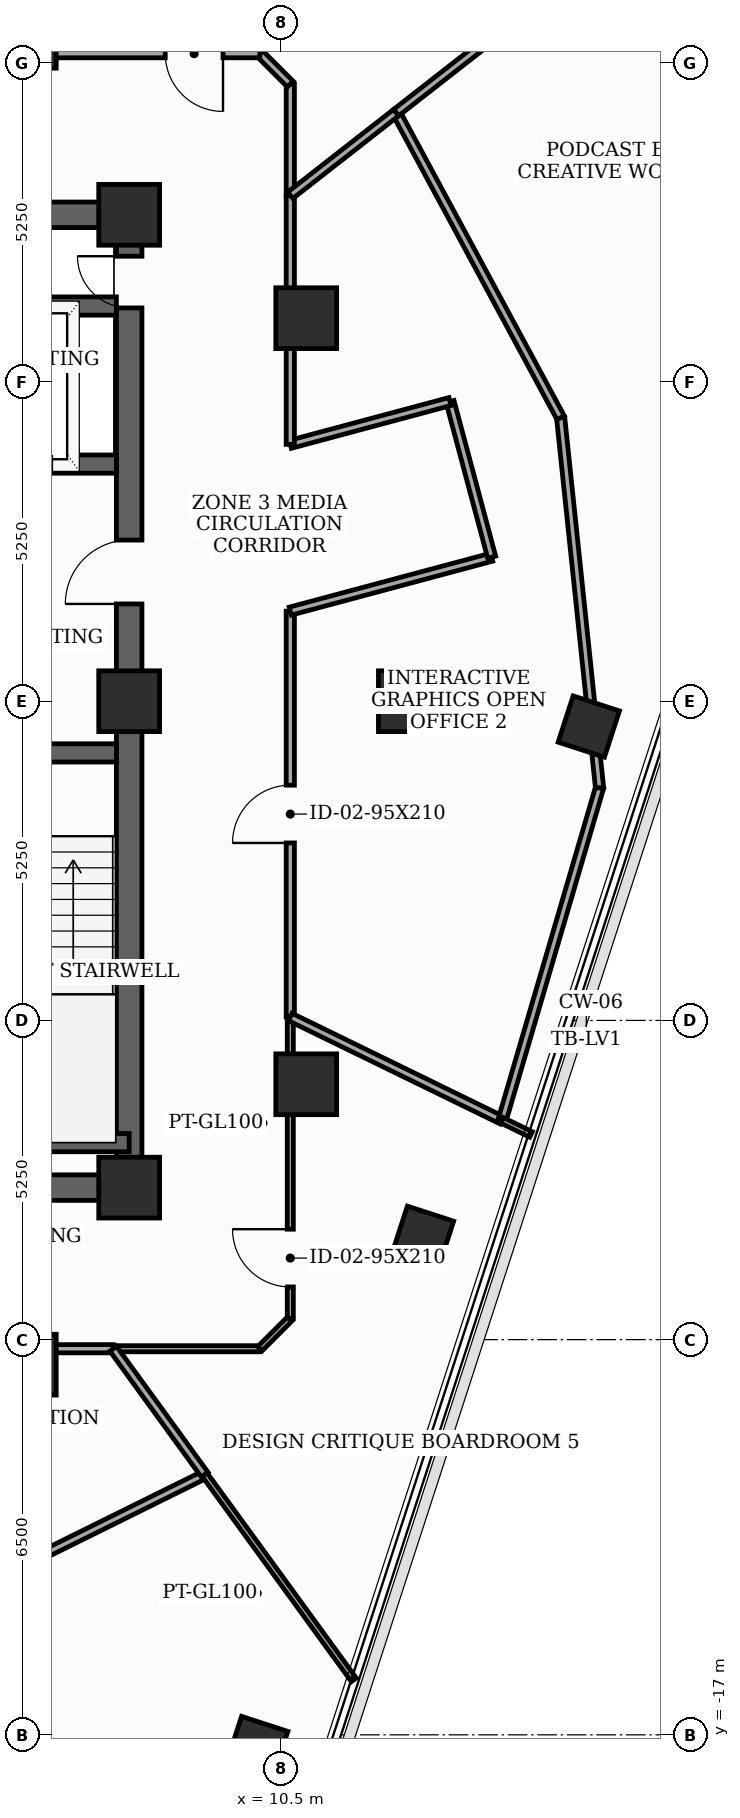
"""IFC4 building model, lengths in metres.
Left out: names, types, materials, properties, quantities, classifications, styles, units other than length and angle.
Written with IfcOpenShell. Run it as: python <this file> out.ifc"""

import sys

from ifc_helpers import new_model, si_unit, direction, frame, frame_2d, origin, origin_2d, place, context, subcontext, project, spatial, rectangle, extrude, element, fill, save


model = new_model("IFC4")
c1 = context("Model", 3, precision=1e-05, world=origin(), true_north=direction((0.0, 1.0)))
c2 = subcontext(c1, "Body", "Model", "MODEL_VIEW")
j1 = project(units=[si_unit("LENGTHUNIT", "METRE"), si_unit("PLANEANGLEUNIT", "RADIAN")], contexts=[c1])
p1 = place(None, origin())
s1 = spatial("IfcSite", under=j1, at=p1, CompositionType="ELEMENT")
p2 = place(p1, origin())
s2 = spatial("IfcBuilding", under=s1, at=p2, CompositionType="ELEMENT")
p3 = place(p2, frame((0.0, 0.0, 301.7)))
s3 = spatial("IfcBuildingStorey", under=s2, at=p3, CompositionType="ELEMENT", Elevation=301.7)
for number, where, z_axis, x_axis in (
    (1, (8.0, -8.0, 0.0), (0.0, 0.0, 1.0), (1.0, 0.0, 0.0)),
    (2, (8.0, 0.0, 0.0), (0.0, 0.0, 1.0), (1.0, 0.0, 0.0)),
    (3, (8.0, 8.0, 0.0), (0.0, 0.0, 1.0), (1.0, 0.0, 0.0)),
    (4, (12.6, 0.0, 0.0), (0.0, 0.0, 1.0), (1.0, 0.0, 0.0)),
    (5, (10.912, 6.3, 0.0), (0.0, 0.0, 1.0), (1.0, 0.0, 0.0)),
    (6, (6.3, 10.912, 0.0), (0.0, 0.0, 1.0), (1.0, 0.0, 0.0)),
    (7, (6.3, -10.912, 0.0), (0.0, 0.0, 1.0), (1.0, 0.0, 0.0)),
    (8, (10.912, -6.3, 0.0), (0.0, 0.0, 1.0), (1.0, 0.0, 0.0)),
):
    element("IfcColumn", number, at=place(p3, frame(where, z_axis=z_axis, x_axis=x_axis)), inside=s3, PredefinedType="COLUMN", context=c2, shape_type="SweptSolid", body=[
        extrude(rectangle(XDim=1.0, YDim=1.0, at=origin_2d()), origin(), (0.0, 0.0, 1.0), 3.7),
    ])
for number, where, z_axis, x_axis in (
    (9, (10.106, -17.201, 0.0), (0.0, 0.0, 1.0), (0.309, 0.951, 0.0)),
    (10, (12.833, -8.809, 0.0), (0.0, 0.0, 1.0), (0.309, 0.951, 0.0)),
    (11, (15.559, -0.417, 0.0), (0.0, 0.0, 1.0), (0.309, 0.951, 0.0)),
):
    element("IfcColumn", number, at=place(p3, frame(where, z_axis=z_axis, x_axis=x_axis)), inside=s3, PredefinedType="COLUMN", context=c2, shape_type="SweptSolid", body=[
        extrude(rectangle(XDim=0.8, YDim=0.8, at=origin_2d()), origin(), (0.0, 0.0, 1.0), 3.7),
    ])
p4 = place(p3, frame((8.0, -8.0, 0.0), z_axis=(0.0, 0.0, 1.0), x_axis=(0.0, 1.0, 0.0)))
e12 = element("IfcWall", 12, at=p4, inside=s3, PredefinedType="SHEAR", context=c2, shape_type="SweptSolid", body=[
    extrude(rectangle(XDim=16.0, YDim=0.42, at=frame_2d((8.0, 0.0))), origin(), (0.0, 0.0, 1.0), 3.5),
])
p5 = place(p4, frame((9.6, 0.0, 0.0)))
e13 = element("IfcOpeningElement", 13, at=p5, cuts=e12, PredefinedType="OPENING", context=c2, shape_type="SweptSolid", body=[
    extrude(rectangle(XDim=1.05, YDim=2.15, at=frame_2d((0.525, 1.075))), frame((0.0, 0.22, 0.0), z_axis=(0.0, -1.0, 0.0), x_axis=(1.0, 0.0, 0.0)), (0.0, 0.0, 1.0), 0.44),
])
p6 = place(p4, frame((14.469, 0.0, 0.0)))
e14 = element("IfcOpeningElement", 14, at=p6, cuts=e12, PredefinedType="OPENING", context=c2, shape_type="SweptSolid", body=[
    extrude(rectangle(XDim=0.85, YDim=2.02, at=frame_2d((0.425, 1.01))), frame((0.0, 0.22, 0.0), z_axis=(0.0, -1.0, 0.0), x_axis=(1.0, 0.0, 0.0)), (0.0, 0.0, 1.0), 0.44),
])
p7 = place(p3, frame((-8.0, -8.0, 0.0), z_axis=(0.0, 0.0, 1.0), x_axis=(1.0, 0.0, 0.0)))
e15 = element("IfcWall", 15, at=p7, inside=s3, PredefinedType="SHEAR", context=c2, shape_type="SweptSolid", body=[
    extrude(rectangle(XDim=16.0, YDim=0.42, at=frame_2d((8.0, 0.0))), origin(), (0.0, 0.0, 1.0), 3.5),
])
p8 = place(p7, frame((4.6, 0.0, 0.0)))
e16 = element("IfcOpeningElement", 16, at=p8, cuts=e15, PredefinedType="OPENING", context=c2, shape_type="SweptSolid", body=[
    extrude(rectangle(XDim=0.95, YDim=2.1, at=frame_2d((0.475, 1.05))), frame((0.0, 0.22, 0.0), z_axis=(0.0, -1.0, 0.0), x_axis=(1.0, 0.0, 0.0)), (0.0, 0.0, 1.0), 0.44),
])
p9 = place(p7, frame((7.52, 0.0, 0.0)))
e17 = element("IfcOpeningElement", 17, at=p9, cuts=e15, PredefinedType="OPENING", context=c2, shape_type="SweptSolid", body=[
    extrude(rectangle(XDim=0.95, YDim=2.1, at=frame_2d((0.475, 1.05))), frame((0.0, 0.22, 0.0), z_axis=(0.0, -1.0, 0.0), x_axis=(1.0, 0.0, 0.0)), (0.0, 0.0, 1.0), 0.44),
])
p10 = place(p7, frame((10.45, 0.0, 0.0)))
e18 = element("IfcOpeningElement", 18, at=p10, cuts=e15, PredefinedType="OPENING", context=c2, shape_type="SweptSolid", body=[
    extrude(rectangle(XDim=0.95, YDim=2.1, at=frame_2d((0.475, 1.05))), frame((0.0, 0.22, 0.0), z_axis=(0.0, -1.0, 0.0), x_axis=(1.0, 0.0, 0.0)), (0.0, 0.0, 1.0), 0.44),
])
p11 = place(p3, frame((-8.0, 8.0, 0.0), z_axis=(0.0, 0.0, 1.0), x_axis=(1.0, 0.0, 0.0)))
e19 = element("IfcWall", 19, at=p11, inside=s3, PredefinedType="SHEAR", context=c2, shape_type="SweptSolid", body=[
    extrude(rectangle(XDim=16.0, YDim=0.42, at=frame_2d((8.0, 0.0))), origin(), (0.0, 0.0, 1.0), 3.5),
])
p12 = place(p11, frame((7.1, 0.0, 0.0)))
e20 = element("IfcOpeningElement", 20, at=p12, cuts=e19, PredefinedType="OPENING", context=c2, shape_type="SweptSolid", body=[
    extrude(rectangle(XDim=1.8, YDim=2.15, at=frame_2d((0.9, 1.075))), frame((0.0, 0.22, 0.0), z_axis=(0.0, -1.0, 0.0), x_axis=(1.0, 0.0, 0.0)), (0.0, 0.0, 1.0), 0.44),
])
p13 = place(p3, frame((4.45, -0.85, 0.0), z_axis=(0.0, 0.0, 1.0), x_axis=(1.0, 0.0, 0.0)))
e21 = element("IfcWall", 21, at=p13, inside=s3, PredefinedType="SHEAR", context=c2, shape_type="SweptSolid", body=[
    extrude(rectangle(XDim=3.34, YDim=0.3, at=frame_2d((1.67, 0.0))), origin(), (0.0, 0.0, 1.0), 3.5),
])
p14 = place(p13, frame((0.65, 0.0, 0.0)))
e22 = element("IfcOpeningElement", 22, at=p14, cuts=e21, PredefinedType="OPENING", context=c2, shape_type="SweptSolid", body=[
    extrude(rectangle(XDim=1.05, YDim=2.15, at=frame_2d((0.525, 1.075))), frame((0.0, 0.16, 0.0), z_axis=(0.0, -1.0, 0.0), x_axis=(1.0, 0.0, 0.0)), (0.0, 0.0, 1.0), 0.32),
])
p15 = place(p3, frame((4.45, -7.26, 0.0), z_axis=(0.0, 0.0, 1.0), x_axis=(1.0, 0.0, 0.0)))
e23 = element("IfcWall", 23, at=p15, inside=s3, PredefinedType="SHEAR", context=c2, shape_type="SweptSolid", body=[
    extrude(rectangle(XDim=3.55, YDim=0.3, at=frame_2d((1.775, 0.0))), origin(), (0.0, 0.0, 1.0), 3.5),
])
p16 = place(p3, frame((4.45, 3.9, 0.0), z_axis=(0.0, 0.0, 1.0), x_axis=(1.0, 0.0, 0.0)))
e24 = element("IfcWall", 24, at=p16, inside=s3, PredefinedType="SHEAR", context=c2, shape_type="SweptSolid", body=[
    extrude(rectangle(XDim=3.34, YDim=0.3, at=frame_2d((1.67, 0.0))), origin(), (0.0, 0.0, 1.0), 3.5),
])
p17 = place(p16, frame((1.18, 0.0, 0.0)))
e25 = element("IfcOpeningElement", 25, at=p17, cuts=e24, PredefinedType="OPENING", context=c2, shape_type="SweptSolid", body=[
    extrude(rectangle(XDim=1.1, YDim=2.1, at=frame_2d((0.55, 1.05))), frame((0.0, 0.16, 0.0), z_axis=(0.0, -1.0, 0.0), x_axis=(1.0, 0.0, 0.0)), (0.0, 0.0, 1.0), 0.32),
])
p18 = place(p3, frame((4.45, 6.5, 0.0), z_axis=(0.0, 0.0, 1.0), x_axis=(1.0, 0.0, 0.0)))
e26 = element("IfcWall", 26, at=p18, inside=s3, PredefinedType="SHEAR", context=c2, shape_type="SweptSolid", body=[
    extrude(rectangle(XDim=3.34, YDim=0.3, at=frame_2d((1.67, 0.0))), origin(), (0.0, 0.0, 1.0), 3.5),
])
p19 = place(p3, frame((10.65, -5.194, 0.0), z_axis=(0.0, 0.0, 1.0), x_axis=(0.0, 1.0, 0.0)))
e27 = element("IfcWall", 27, at=p19, inside=s3, PredefinedType="PARTITIONING", context=c2, shape_type="SweptSolid", body=[
    extrude(rectangle(XDim=6.676, YDim=0.135, at=frame_2d((3.338, 0.0))), origin(), (0.0, 0.0, 1.0), 2.885),
])
p20 = place(p19, frame((2.863, 0.0, 0.0)))
e28 = element("IfcOpeningElement", 28, at=p20, cuts=e27, PredefinedType="OPENING", context=c2, shape_type="SweptSolid", body=[
    extrude(rectangle(XDim=0.95, YDim=2.1, at=frame_2d((0.475, 1.05))), frame((0.0, 0.077, 0.0), z_axis=(0.0, -1.0, 0.0), x_axis=(1.0, 0.0, 0.0)), (0.0, 0.0, 1.0), 0.155),
])
p21 = place(p3, frame((10.65, 1.482, 0.0), z_axis=(0.0, 0.0, 1.0), x_axis=(0.965961397105, 0.2586862565, 0.0)))
e29 = element("IfcWall", 29, at=p21, inside=s3, PredefinedType="PARTITIONING", context=c2, shape_type="SweptSolid", body=[
    extrude(rectangle(XDim=3.429, YDim=0.135, at=frame_2d((1.714, 0.0))), origin(), (0.0, 0.0, 1.0), 2.885),
])
p22 = place(p3, frame((13.962, 2.369, 0.0), z_axis=(0.0, 0.0, 1.0), x_axis=(-0.258413725385, 0.966034340245, 0.0)))
e30 = element("IfcWall", 30, at=p22, inside=s3, PredefinedType="PARTITIONING", context=c2, shape_type="SweptSolid", body=[
    extrude(rectangle(XDim=2.65, YDim=0.135, at=frame_2d((1.325, 0.0))), origin(), (0.0, 0.0, 1.0), 3.5),
])
p23 = place(p3, frame((13.277, 4.929, 0.0), z_axis=(0.0, 0.0, 1.0), x_axis=(-0.965934830229, -0.258785439601, 0.0)))
e31 = element("IfcWall", 31, at=p23, inside=s3, PredefinedType="PARTITIONING", context=c2, shape_type="SweptSolid", body=[
    extrude(rectangle(XDim=2.72, YDim=0.135, at=frame_2d((1.36, 0.0))), origin(), (0.0, 0.0, 1.0), 2.885),
])
p24 = place(p3, frame((10.65, 4.225, 0.0), z_axis=(0.0, 0.0, 1.0), x_axis=(0.0, 1.0, 0.0)))
e32 = element("IfcWall", 32, at=p24, inside=s3, PredefinedType="PARTITIONING", context=c2, shape_type="SweptSolid", body=[
    extrude(rectangle(XDim=4.096, YDim=0.135, at=frame_2d((2.048, 0.0))), origin(), (0.0, 0.0, 1.0), 2.885),
])
p25 = place(p3, frame((2.45, -10.65, 0.0), z_axis=(0.0, 0.0, 1.0), x_axis=(1.0, 0.0, 0.0)))
e33 = element("IfcWall", 33, at=p25, inside=s3, PredefinedType="PARTITIONING", context=c2, shape_type="SweptSolid", body=[
    extrude(rectangle(XDim=5.288, YDim=0.135, at=frame_2d((2.644, 0.0))), origin(), (0.0, 0.0, 1.0), 2.885),
])
p26 = place(p25, frame((0.583, 0.0, 0.0)))
e34 = element("IfcOpeningElement", 34, at=p26, cuts=e33, PredefinedType="OPENING", context=c2, shape_type="SweptSolid", body=[
    extrude(rectangle(XDim=0.95, YDim=2.1, at=frame_2d((0.475, 1.05))), frame((0.0, 0.077, 0.0), z_axis=(0.0, -1.0, 0.0), x_axis=(1.0, 0.0, 0.0)), (0.0, 0.0, 1.0), 0.155),
])
p27 = place(p3, frame((7.738, -10.65, 0.0), z_axis=(0.0, 0.0, 1.0), x_axis=(1.0, 0.0, 0.0)))
e35 = element("IfcWall", 35, at=p27, inside=s3, PredefinedType="MOVABLE", context=c2, shape_type="SweptSolid", body=[
    extrude(rectangle(XDim=2.412, YDim=0.1, at=frame_2d((1.206, 0.0))), origin(), (0.0, 0.0, 1.0), 3.5),
])
p28 = place(p3, frame((10.15, -10.65, 0.0), z_axis=(0.0, 0.0, 1.0), x_axis=(0.707106781187, 0.707106781187, 0.0)))
e36 = element("IfcWall", 36, at=p28, inside=s3, PredefinedType="MOVABLE", context=c2, shape_type="SweptSolid", body=[
    extrude(rectangle(XDim=0.707, YDim=0.1, at=frame_2d((0.354, 0.0))), origin(), (0.0, 0.0, 1.0), 3.5),
])
p29 = place(p3, frame((10.65, -10.15, 0.0), z_axis=(0.0, 0.0, 1.0), x_axis=(0.0, 1.0, 0.0)))
e37 = element("IfcWall", 37, at=p29, inside=s3, PredefinedType="MOVABLE", context=c2, shape_type="SweptSolid", body=[
    extrude(rectangle(XDim=4.956, YDim=0.1, at=frame_2d((2.478, 0.0))), origin(), (0.0, 0.0, 1.0), 2.885),
])
p30 = place(p29, frame((0.516, 0.0, 0.0)))
e38 = element("IfcOpeningElement", 38, at=p30, cuts=e37, PredefinedType="OPENING", context=c2, shape_type="SweptSolid", body=[
    extrude(rectangle(XDim=0.95, YDim=2.1, at=frame_2d((0.475, 1.05))), frame((0.0, 0.06, 0.0), z_axis=(0.0, -1.0, 0.0), x_axis=(1.0, 0.0, 0.0)), (0.0, 0.0, 1.0), 0.12),
])
p31 = place(p3, frame((10.65, 8.321, 0.0), z_axis=(0.0, 0.0, 1.0), x_axis=(0.0, 1.0, 0.0)))
e39 = element("IfcWall", 39, at=p31, inside=s3, PredefinedType="PARTITIONING", context=c2, shape_type="SweptSolid", body=[
    extrude(rectangle(XDim=1.829, YDim=0.135, at=frame_2d((0.915, 0.0))), origin(), (0.0, 0.0, 1.0), 3.5),
])
p32 = place(p3, frame((10.65, 10.15, 0.0), z_axis=(0.0, 0.0, 1.0), x_axis=(-0.707106781187, 0.707106781187, 0.0)))
e40 = element("IfcWall", 40, at=p32, inside=s3, PredefinedType="PARTITIONING", context=c2, shape_type="SweptSolid", body=[
    extrude(rectangle(XDim=0.707, YDim=0.135, at=frame_2d((0.354, 0.0))), origin(), (0.0, 0.0, 1.0), 3.5),
])
p33 = place(p3, frame((10.15, 10.65, 0.0), z_axis=(0.0, 0.0, 1.0), x_axis=(-1.0, 0.0, 0.0)))
e41 = element("IfcWall", 41, at=p33, inside=s3, PredefinedType="PARTITIONING", context=c2, shape_type="SweptSolid", body=[
    extrude(rectangle(XDim=5.408, YDim=0.135, at=frame_2d((2.704, 0.0))), origin(), (0.0, 0.0, 1.0), 2.885),
])
p34 = place(p33, frame((0.607, 0.0, 0.0)))
e42 = element("IfcOpeningElement", 42, at=p34, cuts=e41, PredefinedType="OPENING", context=c2, shape_type="SweptSolid", body=[
    extrude(rectangle(XDim=0.95, YDim=2.1, at=frame_2d((0.475, 1.05))), frame((0.0, 0.077, 0.0), z_axis=(0.0, -1.0, 0.0), x_axis=(1.0, 0.0, 0.0)), (0.0, 0.0, 1.0), 0.155),
])
p35 = place(p3, frame((10.65, -5.194, 0.0), z_axis=(0.0, 0.0, 1.0), x_axis=(0.898781159743, -0.438397567159, 0.0)))
e43 = element("IfcWall", 43, at=p35, inside=s3, PredefinedType="PARTITIONING", context=c2, shape_type="SweptSolid", body=[
    extrude(rectangle(XDim=3.875, YDim=0.135, at=frame_2d((1.938, 0.0))), origin(), (0.0, 0.0, 1.0), 2.885),
])
p36 = place(p3, frame((14.133, -6.893, 0.0), z_axis=(0.0, 0.0, 1.0), x_axis=(0.281231672123, 0.959639904649, 0.0)))
e44 = element("IfcWall", 44, at=p36, inside=s3, PredefinedType="PARTITIONING", context=c2, shape_type="SweptSolid", body=[
    extrude(rectangle(XDim=5.7, YDim=0.135, at=frame_2d((2.85, 0.0))), origin(), (0.0, 0.0, 1.0), 3.5),
])
p37 = place(p3, frame((15.736, -1.423, 0.0), z_axis=(0.0, 0.0, 1.0), x_axis=(-0.104601717472, 0.994514193313, 0.0)))
e45 = element("IfcWall", 45, at=p37, inside=s3, PredefinedType="PARTITIONING", context=c2, shape_type="SweptSolid", body=[
    extrude(rectangle(XDim=6.12, YDim=0.135, at=frame_2d((3.06, 0.0))), origin(), (0.0, 0.0, 1.0), 3.035),
])
p38 = place(p3, frame((15.096, 4.663, 0.0), z_axis=(0.0, 0.0, 1.0), x_axis=(-0.474498198469, 0.88025647379, 0.0)))
e46 = element("IfcWall", 46, at=p38, inside=s3, PredefinedType="PARTITIONING", context=c2, shape_type="SweptSolid", body=[
    extrude(rectangle(XDim=5.7, YDim=0.135, at=frame_2d((2.85, 0.0))), origin(), (0.0, 0.0, 1.0), 3.035),
])
p39 = place(p3, frame((12.391, 9.681, 0.0), z_axis=(0.0, 0.0, 1.0), x_axis=(-0.788124883644, -0.615515367624, 0.0)))
e47 = element("IfcWall", 47, at=p39, inside=s3, PredefinedType="PARTITIONING", context=c2, shape_type="SweptSolid", body=[
    extrude(rectangle(XDim=2.209, YDim=0.135, at=frame_2d((1.104, 0.0))), origin(), (0.0, 0.0, 1.0), 3.5),
])
p40 = place(p3, frame((4.134, -15.25, 0.0), z_axis=(0.0, 0.0, 1.0), x_axis=(0.896167979159, 0.443714945804, 0.0)))
e48 = element("IfcWall", 48, at=p40, inside=s3, PredefinedType="PARTITIONING", context=c2, shape_type="SweptSolid", body=[
    extrude(rectangle(XDim=5.7, YDim=0.135, at=frame_2d((2.85, 0.0))), origin(), (0.0, 0.0, 1.0), 3.035),
])
p41 = place(p3, frame((9.242, -12.721, 0.0), z_axis=(0.0, 0.0, 1.0), x_axis=(-0.58758169089, 0.80916485127, 0.0)))
e49 = element("IfcWall", 49, at=p41, inside=s3, PredefinedType="PARTITIONING", context=c2, shape_type="SweptSolid", body=[
    extrude(rectangle(XDim=2.56, YDim=0.135, at=frame_2d((1.28, 0.0))), origin(), (0.0, 0.0, 1.0), 3.5),
])
p42 = place(p3, frame((11.695, -16.096, 0.0), z_axis=(0.0, 0.0, 1.0), x_axis=(-0.587938546927, 0.808905597111, 0.0)))
e50 = element("IfcWall", 50, at=p42, inside=s3, PredefinedType="MOVABLE", context=c2, shape_type="SweptSolid", body=[
    extrude(rectangle(XDim=4.172, YDim=0.1, at=frame_2d((2.086, 0.0))), origin(), (0.0, 0.0, 1.0), 3.035),
])
p43 = place(p3, frame((14.609, -7.126, 0.0), z_axis=(0.0, 0.0, 1.0), x_axis=(-0.898533726223, 0.438904480313, 0.0)))
e51 = element("IfcWall", 51, at=p43, inside=s3, PredefinedType="MOVABLE", context=c2, shape_type="SweptSolid", body=[
    extrude(rectangle(XDim=0.53, YDim=0.1, at=frame_2d((0.265, 0.0))), origin(), (0.0, 0.0, 1.0), 3.5),
])
p44 = place(p3, frame((22.192, 17.338, 0.0), z_axis=(0.0, 0.0, 1.0), x_axis=(-0.788015446076, -0.615655469192, 0.0)))
e52 = element("IfcWall", 52, at=p44, inside=s3, PredefinedType="PARTITIONING", context=c2, shape_type="SweptSolid", body=[
    extrude(rectangle(XDim=12.438, YDim=0.135, at=frame_2d((6.219, 0.0))), origin(), (0.0, 0.0, 1.0), 3.035),
])
p45 = place(p44, frame((5.759, 0.0, 0.0)))
e53 = element("IfcOpeningElement", 53, at=p45, cuts=e52, PredefinedType="OPENING", context=c2, shape_type="SweptSolid", body=[
    extrude(rectangle(XDim=0.92, YDim=2.1, at=frame_2d((0.46, 1.05))), frame((0.0, 0.077, 0.0), z_axis=(0.0, -1.0, 0.0), x_axis=(1.0, 0.0, 0.0)), (0.0, 0.0, 1.0), 0.155),
])
p46 = place(p5, origin())
e54 = element("IfcDoor", 54, at=p46, inside=s3, OperationType="SINGLE_SWING_LEFT", PredefinedType="DOOR", context=c2, shape_type="SweptSolid", body=[
    extrude(rectangle(XDim=1.05, YDim=2.15, at=frame_2d((0.525, 1.075))), frame((0.0, 0.025, 0.0), z_axis=(0.0, -1.0, 0.0), x_axis=(1.0, 0.0, 0.0)), (0.0, 0.0, 1.0), 0.05),
])
fill(e13, e54)
p47 = place(p6, origin())
e55 = element("IfcDoor", 55, at=p47, inside=s3, OperationType="SINGLE_SWING_RIGHT", PredefinedType="TRAPDOOR", context=c2, shape_type="SweptSolid", body=[
    extrude(rectangle(XDim=0.85, YDim=2.02, at=frame_2d((0.425, 1.01))), frame((0.0, 0.025, 0.0), z_axis=(0.0, -1.0, 0.0), x_axis=(1.0, 0.0, 0.0)), (0.0, 0.0, 1.0), 0.05),
])
fill(e14, e55)
p48 = place(p20, origin())
e56 = element("IfcDoor", 56, at=p48, inside=s3, OperationType="SINGLE_SWING_LEFT", PredefinedType="DOOR", context=c2, shape_type="SweptSolid", body=[
    extrude(rectangle(XDim=0.95, YDim=2.1, at=frame_2d((0.475, 1.05))), frame((0.0, 0.025, 0.0), z_axis=(0.0, -1.0, 0.0), x_axis=(1.0, 0.0, 0.0)), (0.0, 0.0, 1.0), 0.05),
])
fill(e28, e56)
p49 = place(p30, origin())
e57 = element("IfcDoor", 57, at=p49, inside=s3, OperationType="SINGLE_SWING_RIGHT", PredefinedType="DOOR", context=c2, shape_type="SweptSolid", body=[
    extrude(rectangle(XDim=0.95, YDim=2.1, at=frame_2d((0.475, 1.05))), frame((0.0, 0.025, 0.0), z_axis=(0.0, -1.0, 0.0), x_axis=(1.0, 0.0, 0.0)), (0.0, 0.0, 1.0), 0.05),
])
fill(e38, e57)
p50 = place(p34, origin())
e58 = element("IfcDoor", 58, at=p50, inside=s3, OperationType="SINGLE_SWING_LEFT", PredefinedType="DOOR", context=c2, shape_type="SweptSolid", body=[
    extrude(rectangle(XDim=0.95, YDim=2.1, at=frame_2d((0.475, 1.05))), frame((0.0, 0.025, 0.0), z_axis=(0.0, -1.0, 0.0), x_axis=(1.0, 0.0, 0.0)), (0.0, 0.0, 1.0), 0.05),
])
fill(e42, e58)
save(model, sys.argv[1])
